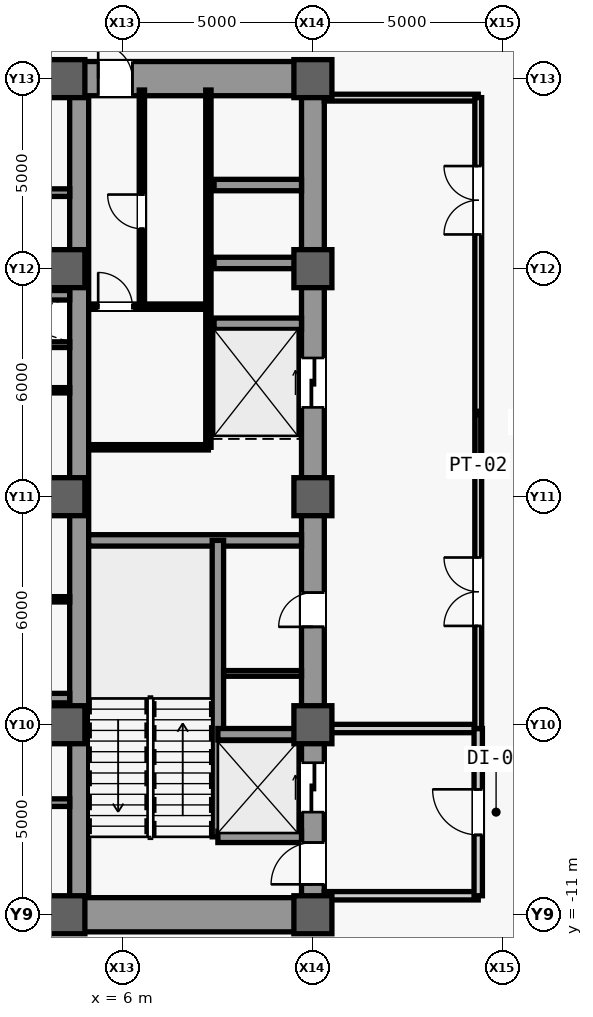
"""IFC4 building model, lengths in metres.
Left out: names, types, materials, properties, quantities, classifications, styles, units other than length and angle.
Written with IfcOpenShell. Run it as: python <this file> out.ifc"""

import sys

from ifc_helpers import new_model, si_unit, direction, frame, frame_2d, origin, origin_2d, place, context, subcontext, project, spatial, rectangle, extrude, source, transform, mapped, element, fill, save


model = new_model("IFC4")
c1 = context("Model", 3, precision=1e-05, world=origin(), true_north=direction((0.0, 1.0)))
c2 = subcontext(c1, "Body", "Model", "MODEL_VIEW")
j1 = project(units=[si_unit("LENGTHUNIT", "METRE"), si_unit("PLANEANGLEUNIT", "RADIAN")], contexts=[c1])
p1 = place(None, origin())
s1 = spatial("IfcSite", under=j1, at=p1, CompositionType="ELEMENT")
p2 = place(p1, origin())
s2 = spatial("IfcBuilding", under=s1, at=p2, CompositionType="ELEMENT")
p3 = place(p2, frame((0.0, 0.0, -4.8)))
s3 = spatial("IfcBuildingStorey", under=s2, at=p3, CompositionType="ELEMENT", Elevation=-4.8)
m1 = source(origin(), c2, "Body", "SweptSolid", [
    extrude(rectangle(XDim=22.0, YDim=0.6, at=frame_2d((11.0, 0.0))), origin(), (0.0, 0.0, 1.0), 4.48),
])
p4 = place(p3, frame((11.0, -11.0, 0.0), z_axis=(0.0, 0.0, 1.0), x_axis=(0.0, 1.0, 0.0)))
e1 = element("IfcWall", 1, at=p4, inside=s3, PredefinedType="SHEAR", context=c2, shape_type="MappedRepresentation", body=[
    mapped(m1, transform((0.0, 0.0, 0.0), scale=1.0)),
])
m2 = source(origin(), c2, "Body", "SweptSolid", [
    extrude(rectangle(XDim=1.1, YDim=2.2, at=frame_2d((0.55, 1.1))), frame((0.0, 0.31, 0.0), z_axis=(0.0, -1.0, 0.0), x_axis=(1.0, 0.0, 0.0)), (0.0, 0.0, 1.0), 0.62),
])
p5 = place(p4, frame((0.8, 0.0, 0.0)))
e2 = element("IfcOpeningElement", 2, at=p5, cuts=e1, PredefinedType="OPENING", context=c2, shape_type="MappedRepresentation", body=[
    mapped(m2, transform((0.0, 0.0, 0.0), scale=1.0)),
])
m3 = source(origin(), c2, "Body", "SweptSolid", [
    extrude(rectangle(XDim=0.9, YDim=2.15, at=frame_2d((0.45, 1.075))), frame((0.0, 0.31, 0.0), z_axis=(0.0, -1.0, 0.0), x_axis=(1.0, 0.0, 0.0)), (0.0, 0.0, 1.0), 0.62),
])
p6 = place(p4, frame((7.575, 0.0, 0.0)))
e3 = element("IfcOpeningElement", 3, at=p6, cuts=e1, PredefinedType="OPENING", context=c2, shape_type="MappedRepresentation", body=[
    mapped(m3, transform((0.0, 0.0, 0.0), scale=1.0)),
])
m4 = source(origin(), c2, "Body", "SweptSolid", [
    extrude(rectangle(XDim=1.3, YDim=2.3, at=frame_2d((0.65, 1.15))), frame((0.0, 0.31, 0.0), z_axis=(0.0, -1.0, 0.0), x_axis=(1.0, 0.0, 0.0)), (0.0, 0.0, 1.0), 0.62),
])
p7 = place(p4, frame((2.7, 0.0, 0.0)))
e4 = element("IfcOpeningElement", 4, at=p7, cuts=e1, PredefinedType="OPENING", context=c2, shape_type="MappedRepresentation", body=[
    mapped(m4, transform((0.0, 0.0, 0.0), scale=1.0)),
])
p8 = place(p4, frame((13.35, 0.0, 0.0)))
e5 = element("IfcOpeningElement", 5, at=p8, cuts=e1, PredefinedType="OPENING", context=c2, shape_type="MappedRepresentation", body=[
    mapped(m4, transform((0.0, 0.0, 0.0), scale=1.0)),
])
m5 = source(origin(), c2, "Body", "SweptSolid", [
    extrude(rectangle(XDim=21.4, YDim=0.5, at=frame_2d((10.7, 0.0))), origin(), (0.0, 0.0, 1.0), 4.48),
])
p9 = place(p3, frame((4.85, -10.7, 0.0), z_axis=(0.0, 0.0, 1.0), x_axis=(0.0, 1.0, 0.0)))
e6 = element("IfcWall", 6, at=p9, inside=s3, PredefinedType="SHEAR", context=c2, shape_type="MappedRepresentation", body=[
    mapped(m5, transform((0.0, 0.0, 0.0), scale=1.0)),
])
m6 = source(origin(), c2, "Body", "SweptSolid", [
    extrude(rectangle(XDim=5.85, YDim=0.9, at=frame_2d((2.925, 0.0))), origin(), (0.0, 0.0, 1.0), 4.48),
])
p10 = place(p3, frame((4.85, -11.0, 0.0), z_axis=(0.0, 0.0, 1.0), x_axis=(1.0, 0.0, 0.0)))
e7 = element("IfcWall", 7, at=p10, inside=s3, PredefinedType="SHEAR", context=c2, shape_type="MappedRepresentation", body=[
    mapped(m6, transform((0.0, 0.0, 0.0), scale=1.0)),
])
p11 = place(p3, frame((4.85, 11.0, 0.0), z_axis=(0.0, 0.0, 1.0), x_axis=(1.0, 0.0, 0.0)))
e8 = element("IfcWall", 8, at=p11, inside=s3, PredefinedType="SHEAR", context=c2, shape_type="MappedRepresentation", body=[
    mapped(m6, transform((0.0, 0.0, 0.0), scale=1.0)),
])
m7 = source(origin(), c2, "Body", "SweptSolid", [
    extrude(rectangle(XDim=0.9, YDim=2.15, at=frame_2d((0.45, 1.075))), frame((0.0, 0.46, 0.0), z_axis=(0.0, -1.0, 0.0), x_axis=(1.0, 0.0, 0.0)), (0.0, 0.0, 1.0), 0.92),
])
p12 = place(p11, frame((0.5, 0.0, 0.0)))
e9 = element("IfcOpeningElement", 9, at=p12, cuts=e8, PredefinedType="OPENING", context=c2, shape_type="MappedRepresentation", body=[
    mapped(m7, transform((0.0, 0.0, 0.0), scale=1.0)),
])
m8 = source(origin(), c2, "Body", "SweptSolid", [
    extrude(rectangle(XDim=5.6, YDim=0.3, at=frame_2d((2.8, 0.0))), origin(), (0.0, 0.0, 1.0), 4.48),
])
p13 = place(p3, frame((5.1, -1.15, 0.0), z_axis=(0.0, 0.0, 1.0), x_axis=(1.0, 0.0, 0.0)))
e10 = element("IfcWall", 10, at=p13, inside=s3, PredefinedType="SHEAR", context=c2, shape_type="MappedRepresentation", body=[
    mapped(m8, transform((0.0, 0.0, 0.0), scale=1.0)),
])
m9 = source(origin(), c2, "Body", "SweptSolid", [
    extrude(rectangle(XDim=9.2, YDim=0.5, at=frame_2d((4.6, 0.0))), origin(), (0.0, 0.0, 1.0), 4.48),
])
p14 = place(p3, frame((-4.6, -11.0, 0.0), z_axis=(0.0, 0.0, 1.0), x_axis=(1.0, 0.0, 0.0)))
e11 = element("IfcWall", 11, at=p14, inside=s3, PredefinedType="SHEAR", context=c2, shape_type="MappedRepresentation", body=[
    mapped(m9, transform((0.0, 0.0, 0.0), scale=1.0)),
])
m10 = source(origin(), c2, "Body", "SweptSolid", [
    extrude(rectangle(XDim=1.8, YDim=2.25, at=frame_2d((0.9, 1.125))), frame((0.0, 0.26, 0.0), z_axis=(0.0, -1.0, 0.0), x_axis=(1.0, 0.0, 0.0)), (0.0, 0.0, 1.0), 0.52),
])
p15 = place(p14, frame((3.7, 0.0, 0.0)))
e12 = element("IfcOpeningElement", 12, at=p15, cuts=e11, PredefinedType="OPENING", context=c2, shape_type="MappedRepresentation", body=[
    mapped(m10, transform((0.0, 0.0, 0.0), scale=1.0)),
])
p16 = place(p3, frame((-4.6, 11.0, 0.0), z_axis=(0.0, 0.0, 1.0), x_axis=(1.0, 0.0, 0.0)))
e13 = element("IfcWall", 13, at=p16, inside=s3, PredefinedType="SHEAR", context=c2, shape_type="MappedRepresentation", body=[
    mapped(m9, transform((0.0, 0.0, 0.0), scale=1.0)),
])
p17 = place(p16, frame((3.7, 0.0, 0.0)))
e14 = element("IfcOpeningElement", 14, at=p17, cuts=e13, PredefinedType="OPENING", context=c2, shape_type="MappedRepresentation", body=[
    mapped(m10, transform((0.0, 0.0, 0.0), scale=1.0)),
])
m11 = source(origin(), c2, "Body", "SweptSolid", [
    extrude(rectangle(XDim=1.0, YDim=1.0, at=origin_2d()), origin(), (0.0, 0.0, 1.0), 4.8),
])
for number, where, z_axis, x_axis in (
    (15, (4.5, -11.0, 0.0), (0.0, 0.0, 1.0), (1.0, 0.0, 0.0)),
    (16, (4.5, -6.0, 0.0), (0.0, 0.0, 1.0), (1.0, 0.0, 0.0)),
    (17, (4.5, 0.0, 0.0), (0.0, 0.0, 1.0), (1.0, 0.0, 0.0)),
    (18, (4.5, 6.0, 0.0), (0.0, 0.0, 1.0), (1.0, 0.0, 0.0)),
    (19, (4.5, 11.0, 0.0), (0.0, 0.0, 1.0), (1.0, 0.0, 0.0)),
    (20, (11.0, -11.0, 0.0), (0.0, 0.0, 1.0), (1.0, 0.0, 0.0)),
    (21, (11.0, -6.0, 0.0), (0.0, 0.0, 1.0), (1.0, 0.0, 0.0)),
    (22, (11.0, 0.0, 0.0), (0.0, 0.0, 1.0), (1.0, 0.0, 0.0)),
    (23, (11.0, 6.0, 0.0), (0.0, 0.0, 1.0), (1.0, 0.0, 0.0)),
    (24, (11.0, 11.0, 0.0), (0.0, 0.0, 1.0), (1.0, 0.0, 0.0)),
):
    element("IfcColumn", number, at=place(p3, frame(where, z_axis=z_axis, x_axis=x_axis)), inside=s3, PredefinedType="COLUMN", context=c2, shape_type="MappedRepresentation", body=[
        mapped(m11, transform((0.0, 0.0, 0.0), scale=1.0)),
    ])
m12 = source(origin(), c2, "Body", "SweptSolid", [
    extrude(rectangle(XDim=7.8, YDim=0.3, at=frame_2d((3.9, 0.0))), origin(), (0.0, 0.0, 1.0), 4.48),
])
p18 = place(p3, frame((8.5, -8.95, 0.0), z_axis=(0.0, 0.0, 1.0), x_axis=(0.0, 1.0, 0.0)))
e25 = element("IfcWall", 25, at=p18, inside=s3, PredefinedType="SHEAR", context=c2, shape_type="MappedRepresentation", body=[
    mapped(m12, transform((0.0, 0.0, 0.0), scale=1.0)),
])
m13 = source(origin(), c2, "Body", "SweptSolid", [
    extrude(rectangle(XDim=2.2, YDim=0.3, at=frame_2d((1.1, 0.0))), origin(), (0.0, 0.0, 1.0), 4.48),
])
for number, where, z_axis, x_axis in (
    (26, (8.5, -8.95, 0.0), (0.0, 0.0, 1.0), (1.0, 0.0, 0.0)),
    (27, (8.5, -6.25, 0.0), (0.0, 0.0, 1.0), (1.0, 0.0, 0.0)),
):
    element("IfcWall", number, at=place(p3, frame(where, z_axis=z_axis, x_axis=x_axis)), inside=s3, PredefinedType="SHEAR", context=c2, shape_type="MappedRepresentation", body=[
        mapped(m13, transform((0.0, 0.0, 0.0), scale=1.0)),
    ])
m14 = source(origin(), c2, "Body", "SweptSolid", [
    extrude(rectangle(XDim=2.3, YDim=0.3, at=frame_2d((1.15, 0.0))), origin(), (0.0, 0.0, 1.0), 4.48),
])
for number, where, z_axis, x_axis in (
    (28, (8.4, 4.55, 0.0), (0.0, 0.0, 1.0), (1.0, 0.0, 0.0)),
    (29, (8.4, 6.15, 0.0), (0.0, 0.0, 1.0), (1.0, 0.0, 0.0)),
    (30, (8.4, 8.2, 0.0), (0.0, 0.0, 1.0), (1.0, 0.0, 0.0)),
):
    element("IfcWall", number, at=place(p3, frame(where, z_axis=z_axis, x_axis=x_axis)), inside=s3, PredefinedType="SHEAR", context=c2, shape_type="MappedRepresentation", body=[
        mapped(m14, transform((0.0, 0.0, 0.0), scale=1.0)),
    ])
m15 = source(origin(), c2, "Body", "SweptSolid", [
    extrude(rectangle(XDim=2.05, YDim=0.15, at=frame_2d((1.025, 0.0))), origin(), (0.0, 0.0, 1.0), 4.48),
])
p19 = place(p3, frame((8.65, -4.65, 0.0), z_axis=(0.0, 0.0, 1.0), x_axis=(1.0, 0.0, 0.0)))
e31 = element("IfcWall", 31, at=p19, inside=s3, PredefinedType="PARTITIONING", context=c2, shape_type="MappedRepresentation", body=[
    mapped(m15, transform((0.0, 0.0, 0.0), scale=1.0)),
])
m16 = source(origin(), c2, "Body", "SweptSolid", [
    extrude(rectangle(XDim=9.4, YDim=0.14, at=frame_2d((4.7, 0.0))), origin(), (0.0, 0.0, 1.0), 4.48),
])
p20 = place(p3, frame((8.25, 1.3, 0.0), z_axis=(0.0, 0.0, 1.0), x_axis=(0.0, 1.0, 0.0)))
e32 = element("IfcWall", 32, at=p20, inside=s3, PredefinedType="PARTITIONING", context=c2, shape_type="MappedRepresentation", body=[
    mapped(m16, transform((0.0, 0.0, 0.0), scale=1.0)),
])
m17 = source(origin(), c2, "Body", "SweptSolid", [
    extrude(rectangle(XDim=3.15, YDim=0.14, at=frame_2d((1.575, 0.0))), origin(), (0.0, 0.0, 1.0), 4.48),
])
p21 = place(p3, frame((5.1, 1.3, 0.0), z_axis=(0.0, 0.0, 1.0), x_axis=(1.0, 0.0, 0.0)))
e33 = element("IfcWall", 33, at=p21, inside=s3, PredefinedType="PARTITIONING", context=c2, shape_type="MappedRepresentation", body=[
    mapped(m17, transform((0.0, 0.0, 0.0), scale=1.0)),
])
m18 = source(origin(), c2, "Body", "SweptSolid", [
    extrude(rectangle(XDim=5.7, YDim=0.14, at=frame_2d((2.85, 0.0))), origin(), (0.0, 0.0, 1.0), 4.48),
])
p22 = place(p3, frame((6.5, 5.0, 0.0), z_axis=(0.0, 0.0, 1.0), x_axis=(0.0, 1.0, 0.0)))
e34 = element("IfcWall", 34, at=p22, inside=s3, PredefinedType="PARTITIONING", context=c2, shape_type="MappedRepresentation", body=[
    mapped(m18, transform((0.0, 0.0, 0.0), scale=1.0)),
])
m19 = source(origin(), c2, "Body", "SweptSolid", [
    extrude(rectangle(XDim=0.9, YDim=2.15, at=frame_2d((0.45, 1.075))), frame((0.0, 0.08, 0.0), z_axis=(0.0, -1.0, 0.0), x_axis=(1.0, 0.0, 0.0)), (0.0, 0.0, 1.0), 0.16),
])
p23 = place(p22, frame((2.05, 0.0, 0.0)))
e35 = element("IfcOpeningElement", 35, at=p23, cuts=e34, PredefinedType="OPENING", context=c2, shape_type="MappedRepresentation", body=[
    mapped(m19, transform((0.0, 0.0, 0.0), scale=1.0)),
])
p24 = place(p3, frame((5.1, 5.0, 0.0), z_axis=(0.0, 0.0, 1.0), x_axis=(1.0, 0.0, 0.0)))
e36 = element("IfcWall", 36, at=p24, inside=s3, PredefinedType="PARTITIONING", context=c2, shape_type="MappedRepresentation", body=[
    mapped(m17, transform((0.0, 0.0, 0.0), scale=1.0)),
])
p25 = place(p24, frame((0.25, 0.0, 0.0)))
e37 = element("IfcOpeningElement", 37, at=p25, cuts=e36, PredefinedType="OPENING", context=c2, shape_type="MappedRepresentation", body=[
    mapped(m19, transform((0.0, 0.0, 0.0), scale=1.0)),
])
m20 = source(origin(), c2, "Body", "SweptSolid", [
    extrude(rectangle(XDim=4.05, YDim=0.22, at=frame_2d((2.025, 0.0))), origin(), (0.0, 0.0, 1.0), 4.48),
])
for number, where, z_axis, x_axis in (
    (38, (11.3, -10.5, 0.0), (0.0, 0.0, 1.0), (1.0, 0.0, 0.0)),
    (39, (11.3, -6.1, 0.0), (0.0, 0.0, 1.0), (1.0, 0.0, 0.0)),
):
    element("IfcWall", number, at=place(p3, frame(where, z_axis=z_axis, x_axis=x_axis)), inside=s3, PredefinedType="PARTITIONING", context=c2, shape_type="MappedRepresentation", body=[
        mapped(m20, transform((0.0, 0.0, 0.0), scale=1.0)),
    ])
m21 = source(origin(), c2, "Body", "SweptSolid", [
    extrude(rectangle(XDim=4.4, YDim=0.22, at=frame_2d((2.2, 0.0))), origin(), (0.0, 0.0, 1.0), 4.48),
])
p26 = place(p3, frame((15.35, -10.5, 0.0), z_axis=(0.0, 0.0, 1.0), x_axis=(0.0, 1.0, 0.0)))
e40 = element("IfcWall", 40, at=p26, inside=s3, PredefinedType="PARTITIONING", context=c2, shape_type="MappedRepresentation", body=[
    mapped(m21, transform((0.0, 0.0, 0.0), scale=1.0)),
])
m22 = source(origin(), c2, "Body", "SweptSolid", [
    extrude(rectangle(XDim=1.2, YDim=2.2, at=frame_2d((0.6, 1.1))), frame((0.0, 0.12, 0.0), z_axis=(0.0, -1.0, 0.0), x_axis=(1.0, 0.0, 0.0)), (0.0, 0.0, 1.0), 0.24),
])
p27 = place(p26, frame((1.6, 0.0, 0.0)))
e41 = element("IfcOpeningElement", 41, at=p27, cuts=e40, PredefinedType="OPENING", context=c2, shape_type="MappedRepresentation", body=[
    mapped(m22, transform((0.0, 0.0, 0.0), scale=1.0)),
])
m23 = source(origin(), c2, "Body", "SweptSolid", [
    extrude(rectangle(XDim=4.05, YDim=0.18, at=frame_2d((2.025, 0.0))), origin(), (0.0, 0.0, 1.0), 4.48),
])
p28 = place(p3, frame((11.3, 10.5, 0.0), z_axis=(0.0, 0.0, 1.0), x_axis=(1.0, 0.0, 0.0)))
e42 = element("IfcWall", 42, at=p28, inside=s3, PredefinedType="PARTITIONING", context=c2, shape_type="MappedRepresentation", body=[
    mapped(m23, transform((0.0, 0.0, 0.0), scale=1.0)),
])
m24 = source(origin(), c2, "Body", "SweptSolid", [
    extrude(rectangle(XDim=16.6, YDim=0.18, at=frame_2d((8.3, 0.0))), origin(), (0.0, 0.0, 1.0), 4.48),
])
p29 = place(p3, frame((15.35, -6.1, 0.0), z_axis=(0.0, 0.0, 1.0), x_axis=(0.0, 1.0, 0.0)))
e43 = element("IfcWall", 43, at=p29, inside=s3, PredefinedType="PARTITIONING", context=c2, shape_type="MappedRepresentation", body=[
    mapped(m24, transform((0.0, 0.0, 0.0), scale=1.0)),
])
m25 = source(origin(), c2, "Body", "SweptSolid", [
    extrude(rectangle(XDim=1.8, YDim=2.25, at=frame_2d((0.9, 1.125))), frame((0.0, 0.1, 0.0), z_axis=(0.0, -1.0, 0.0), x_axis=(1.0, 0.0, 0.0)), (0.0, 0.0, 1.0), 0.2),
])
p30 = place(p29, frame((2.7, 0.0, 0.0)))
e44 = element("IfcOpeningElement", 44, at=p30, cuts=e43, PredefinedType="OPENING", context=c2, shape_type="MappedRepresentation", body=[
    mapped(m25, transform((0.0, 0.0, 0.0), scale=1.0)),
])
p31 = place(p29, frame((13.0, 0.0, 0.0)))
e45 = element("IfcOpeningElement", 45, at=p31, cuts=e43, PredefinedType="OPENING", context=c2, shape_type="MappedRepresentation", body=[
    mapped(m25, transform((0.0, 0.0, 0.0), scale=1.0)),
])
m26 = source(origin(), c2, "Body", "SweptSolid", [
    extrude(rectangle(XDim=3.45, YDim=0.15, at=frame_2d((1.725, 0.0))), origin(), (0.0, 0.0, 1.0), 4.48),
])
p32 = place(p3, frame((1.15, 4.0, 0.0), z_axis=(0.0, 0.0, 1.0), x_axis=(1.0, 0.0, 0.0)))
e46 = element("IfcWall", 46, at=p32, inside=s3, PredefinedType="PARTITIONING", context=c2, shape_type="MappedRepresentation", body=[
    mapped(m26, transform((0.0, 0.0, 0.0), scale=1.0)),
])
m27 = source(origin(), c2, "Body", "SweptSolid", [
    extrude(rectangle(XDim=2.45, YDim=0.2, at=frame_2d((1.225, 0.0))), origin(), (0.0, 0.0, 1.0), 4.48),
])
p33 = place(p3, frame((2.15, -8.05, 0.0), z_axis=(0.0, 0.0, 1.0), x_axis=(1.0, 0.0, 0.0)))
e47 = element("IfcWall", 47, at=p33, inside=s3, PredefinedType="SHEAR", context=c2, shape_type="MappedRepresentation", body=[
    mapped(m27, transform((0.0, 0.0, 0.0), scale=1.0)),
])
m28 = source(origin(), c2, "Body", "SweptSolid", [
    extrude(rectangle(XDim=9.2, YDim=0.25, at=frame_2d((4.6, 0.0))), origin(), (0.0, 0.0, 1.0), 4.48),
])
p34 = place(p3, frame((-4.6, -5.3, 0.0), z_axis=(0.0, 0.0, 1.0), x_axis=(1.0, 0.0, 0.0)))
e48 = element("IfcWall", 48, at=p34, inside=s3, PredefinedType="SHEAR", context=c2, shape_type="MappedRepresentation", body=[
    mapped(m28, transform((0.0, 0.0, 0.0), scale=1.0)),
])
m29 = source(origin(), c2, "Body", "SweptSolid", [
    extrude(rectangle(XDim=1.05, YDim=2.2, at=frame_2d((0.525, 1.1))), frame((0.0, 0.135, 0.0), z_axis=(0.0, -1.0, 0.0), x_axis=(1.0, 0.0, 0.0)), (0.0, 0.0, 1.0), 0.27),
])
p35 = place(p34, frame((4.075, 0.0, 0.0)))
e49 = element("IfcOpeningElement", 49, at=p35, cuts=e48, PredefinedType="OPENING", context=c2, shape_type="MappedRepresentation", body=[
    mapped(m29, transform((0.0, 0.0, 0.0), scale=1.0)),
])
p36 = place(p3, frame((2.15, 8.0, 0.0), z_axis=(0.0, 0.0, 1.0), x_axis=(1.0, 0.0, 0.0)))
e50 = element("IfcWall", 50, at=p36, inside=s3, PredefinedType="SHEAR", context=c2, shape_type="MappedRepresentation", body=[
    mapped(m27, transform((0.0, 0.0, 0.0), scale=1.0)),
])
p37 = place(p3, frame((-4.6, 5.3, 0.0), z_axis=(0.0, 0.0, 1.0), x_axis=(1.0, 0.0, 0.0)))
e51 = element("IfcWall", 51, at=p37, inside=s3, PredefinedType="SHEAR", context=c2, shape_type="MappedRepresentation", body=[
    mapped(m28, transform((0.0, 0.0, 0.0), scale=1.0)),
])
p38 = place(p37, frame((4.075, 0.0, 0.0)))
e52 = element("IfcOpeningElement", 52, at=p38, cuts=e51, PredefinedType="OPENING", context=c2, shape_type="MappedRepresentation", body=[
    mapped(m29, transform((0.0, 0.0, 0.0), scale=1.0)),
])
m30 = source(origin(), c2, "Body", "SweptSolid", [
    extrude(rectangle(XDim=3.45, YDim=0.14, at=frame_2d((1.725, 0.0))), origin(), (0.0, 0.0, 1.0), 4.48),
])
p39 = place(p3, frame((1.15, -2.7, 0.0), z_axis=(0.0, 0.0, 1.0), x_axis=(1.0, 0.0, 0.0)))
e53 = element("IfcWall", 53, at=p39, inside=s3, PredefinedType="PARTITIONING", context=c2, shape_type="MappedRepresentation", body=[
    mapped(m30, transform((0.0, 0.0, 0.0), scale=1.0)),
])
m31 = source(origin(), c2, "Body", "SweptSolid", [
    extrude(rectangle(XDim=3.45, YDim=0.14, at=frame_2d((1.725, 0.0))), origin(), (0.0, 0.0, 1.0), 3.785),
])
p40 = place(p3, frame((1.15, 0.1, 0.0), z_axis=(0.0, 0.0, 1.0), x_axis=(1.0, 0.0, 0.0)))
e54 = element("IfcWall", 54, at=p40, inside=s3, PredefinedType="PARTITIONING", context=c2, shape_type="MappedRepresentation", body=[
    mapped(m31, transform((0.0, 0.0, 0.0), scale=1.0)),
])
p41 = place(p3, frame((1.15, 2.8, 0.0), z_axis=(0.0, 0.0, 1.0), x_axis=(1.0, 0.0, 0.0)))
e55 = element("IfcWall", 55, at=p41, inside=s3, PredefinedType="PARTITIONING", context=c2, shape_type="MappedRepresentation", body=[
    mapped(m30, transform((0.0, 0.0, 0.0), scale=1.0)),
])
m32 = source(origin(), c2, "Body", "SweptSolid", [
    extrude(rectangle(XDim=1.1, YDim=2.2, at=frame_2d((0.55, 1.1))), frame((0.0, 0.025, 0.0), z_axis=(0.0, -1.0, 0.0), x_axis=(1.0, 0.0, 0.0)), (0.0, 0.0, 1.0), 0.05),
])
p42 = place(p5, origin())
e56 = element("IfcDoor", 56, at=p42, inside=s3, OperationType="SINGLE_SWING_LEFT", PredefinedType="DOOR", context=c2, shape_type="MappedRepresentation", body=[
    mapped(m32, transform((0.0, 0.0, 0.0), scale=1.0)),
])
fill(e2, e56)
m33 = source(origin(), c2, "Body", "SweptSolid", [
    extrude(rectangle(XDim=0.9, YDim=2.15, at=frame_2d((0.45, 1.075))), frame((0.0, 0.025, 0.0), z_axis=(0.0, -1.0, 0.0), x_axis=(1.0, 0.0, 0.0)), (0.0, 0.0, 1.0), 0.05),
])
p43 = place(p6, origin())
e57 = element("IfcDoor", 57, at=p43, inside=s3, OperationType="SINGLE_SWING_LEFT", PredefinedType="DOOR", context=c2, shape_type="MappedRepresentation", body=[
    mapped(m33, transform((0.0, 0.0, 0.0), scale=1.0)),
])
fill(e3, e57)
p44 = place(p12, origin())
e58 = element("IfcDoor", 58, at=p44, inside=s3, OperationType="SINGLE_SWING_LEFT", PredefinedType="DOOR", context=c2, shape_type="MappedRepresentation", body=[
    mapped(m33, transform((0.0, 0.0, 0.0), scale=1.0)),
])
fill(e9, e58)
p45 = place(p23, origin())
e59 = element("IfcDoor", 59, at=p45, inside=s3, OperationType="SINGLE_SWING_RIGHT", PredefinedType="DOOR", context=c2, shape_type="MappedRepresentation", body=[
    mapped(m33, transform((0.0, 0.0, 0.0), scale=1.0)),
])
fill(e35, e59)
p46 = place(p25, origin())
e60 = element("IfcDoor", 60, at=p46, inside=s3, OperationType="SINGLE_SWING_LEFT", PredefinedType="DOOR", context=c2, shape_type="MappedRepresentation", body=[
    mapped(m33, transform((0.0, 0.0, 0.0), scale=1.0)),
])
fill(e37, e60)
m34 = source(origin(), c2, "Body", "SweptSolid", [
    extrude(rectangle(XDim=1.2, YDim=2.2, at=frame_2d((0.6, 1.1))), frame((0.0, 0.025, 0.0), z_axis=(0.0, -1.0, 0.0), x_axis=(1.0, 0.0, 0.0)), (0.0, 0.0, 1.0), 0.05),
])
p47 = place(p27, origin())
e61 = element("IfcDoor", 61, at=p47, inside=s3, OperationType="SINGLE_SWING_RIGHT", PredefinedType="DOOR", context=c2, shape_type="MappedRepresentation", body=[
    mapped(m34, transform((0.0, 0.0, 0.0), scale=1.0)),
])
fill(e41, e61)
m35 = source(origin(), c2, "Body", "SweptSolid", [
    extrude(rectangle(XDim=1.8, YDim=2.25, at=frame_2d((0.9, 1.125))), frame((0.0, 0.025, 0.0), z_axis=(0.0, -1.0, 0.0), x_axis=(1.0, 0.0, 0.0)), (0.0, 0.0, 1.0), 0.05),
])
p48 = place(p30, origin())
e62 = element("IfcDoor", 62, at=p48, inside=s3, OperationType="SINGLE_SWING_RIGHT", PredefinedType="DOOR", context=c2, shape_type="MappedRepresentation", body=[
    mapped(m35, transform((0.0, 0.0, 0.0), scale=1.0)),
])
fill(e44, e62)
p49 = place(p31, origin())
e63 = element("IfcDoor", 63, at=p49, inside=s3, OperationType="SINGLE_SWING_LEFT", PredefinedType="DOOR", context=c2, shape_type="MappedRepresentation", body=[
    mapped(m35, transform((0.0, 0.0, 0.0), scale=1.0)),
])
fill(e45, e63)
m36 = source(origin(), c2, "Body", "SweptSolid", [
    extrude(rectangle(XDim=1.3, YDim=2.3, at=frame_2d((0.65, 1.15))), frame((0.0, 0.025, 0.0), z_axis=(0.0, -1.0, 0.0), x_axis=(1.0, 0.0, 0.0)), (0.0, 0.0, 1.0), 0.05),
])
p50 = place(p7, origin())
e64 = element("IfcDoor", 64, at=p50, inside=s3, OperationType="SLIDING_TO_LEFT", PredefinedType="DOOR", context=c2, shape_type="MappedRepresentation", body=[
    mapped(m36, transform((0.0, 0.0, 0.0), scale=1.0)),
])
fill(e4, e64)
p51 = place(p8, origin())
e65 = element("IfcDoor", 65, at=p51, inside=s3, OperationType="SLIDING_TO_LEFT", PredefinedType="DOOR", context=c2, shape_type="MappedRepresentation", body=[
    mapped(m36, transform((0.0, 0.0, 0.0), scale=1.0)),
])
fill(e5, e65)
save(model, sys.argv[1])
